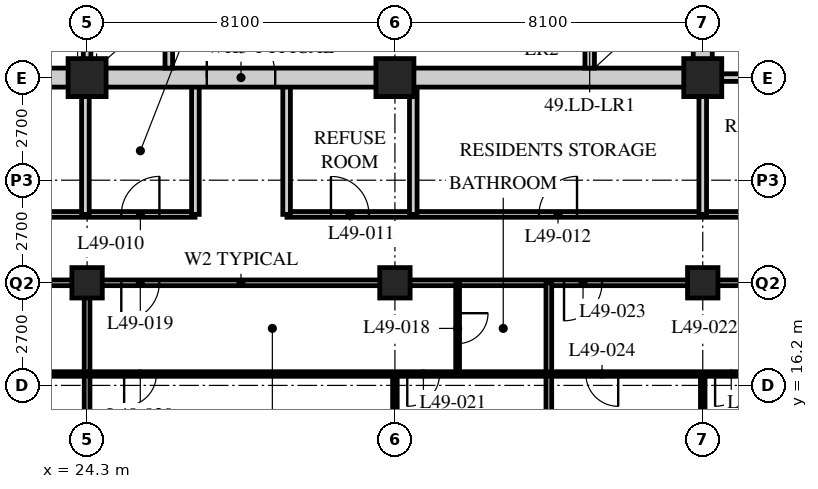
"""IFC4 building model, lengths in metres.
Left out: names, types, materials, properties, quantities, classifications, styles, units other than length and angle.
Written with IfcOpenShell. Run it as: python <this file> out.ifc"""

import sys

from ifc_helpers import new_model, si_unit, direction, frame, frame_2d, origin, origin_2d, place, context, subcontext, project, spatial, rectangle, hollow_rectangle, extrude, element, fill, save


model = new_model("IFC4")
c1 = context("Model", 3, precision=1e-05, world=origin(), true_north=direction((0.0, 1.0)))
c2 = subcontext(c1, "Body", "Model", "MODEL_VIEW")
j1 = project(units=[si_unit("LENGTHUNIT", "METRE"), si_unit("PLANEANGLEUNIT", "RADIAN")], contexts=[c1])
p1 = place(None, origin())
s1 = spatial("IfcSite", under=j1, at=p1, CompositionType="ELEMENT")
p2 = place(p1, origin())
s2 = spatial("IfcBuilding", under=s1, at=p2, CompositionType="ELEMENT")
p3 = place(p2, frame((0.0, 0.0, 192.0)))
s3 = spatial("IfcBuildingStorey", under=s2, at=p3, CompositionType="ELEMENT", Elevation=192.0)
p4 = place(p3, frame((24.3, 18.9, 0.0), z_axis=(0.0, 0.0, 1.0), x_axis=(1.0, 0.0, 0.0)))
e1 = element("IfcColumn", 1, at=p4, inside=s3, PredefinedType="COLUMN", context=c2, shape_type="SweptSolid", body=[
    extrude(hollow_rectangle(XDim=0.8, YDim=0.8, WallThickness=0.08, at=origin_2d()), origin(), (0.0, 0.0, 1.0), 3.6),
])
p5 = place(p3, frame((24.3, 24.3, 0.0), z_axis=(0.0, 0.0, 1.0), x_axis=(1.0, 0.0, 0.0)))
e2 = element("IfcColumn", 2, at=p5, inside=s3, PredefinedType="COLUMN", context=c2, shape_type="SweptSolid", body=[
    extrude(hollow_rectangle(XDim=1.0, YDim=1.0, WallThickness=0.1, at=origin_2d()), origin(), (0.0, 0.0, 1.0), 3.6),
])
p6 = place(p3, frame((32.4, 18.9, 0.0), z_axis=(0.0, 0.0, 1.0), x_axis=(1.0, 0.0, 0.0)))
e3 = element("IfcColumn", 3, at=p6, inside=s3, PredefinedType="COLUMN", context=c2, shape_type="SweptSolid", body=[
    extrude(hollow_rectangle(XDim=0.8, YDim=0.8, WallThickness=0.08, at=origin_2d()), origin(), (0.0, 0.0, 1.0), 3.6),
])
p7 = place(p3, frame((32.4, 24.3, 0.0), z_axis=(0.0, 0.0, 1.0), x_axis=(1.0, 0.0, 0.0)))
e4 = element("IfcColumn", 4, at=p7, inside=s3, PredefinedType="COLUMN", context=c2, shape_type="SweptSolid", body=[
    extrude(hollow_rectangle(XDim=1.0, YDim=1.0, WallThickness=0.1, at=origin_2d()), origin(), (0.0, 0.0, 1.0), 3.6),
])
p8 = place(p3, frame((40.5, 18.9, 0.0), z_axis=(0.0, 0.0, 1.0), x_axis=(1.0, 0.0, 0.0)))
e5 = element("IfcColumn", 5, at=p8, inside=s3, PredefinedType="COLUMN", context=c2, shape_type="SweptSolid", body=[
    extrude(hollow_rectangle(XDim=0.8, YDim=0.8, WallThickness=0.08, at=origin_2d()), origin(), (0.0, 0.0, 1.0), 3.6),
])
p9 = place(p3, frame((40.5, 24.3, 0.0), z_axis=(0.0, 0.0, 1.0), x_axis=(1.0, 0.0, 0.0)))
e6 = element("IfcColumn", 6, at=p9, inside=s3, PredefinedType="COLUMN", context=c2, shape_type="SweptSolid", body=[
    extrude(hollow_rectangle(XDim=1.0, YDim=1.0, WallThickness=0.1, at=origin_2d()), origin(), (0.0, 0.0, 1.0), 3.6),
])
p10 = place(p3, frame((8.1, 18.9, 0.0), z_axis=(0.0, 0.0, 1.0), x_axis=(1.0, 0.0, 0.0)))
e7 = element("IfcWall", 7, at=p10, inside=s3, PredefinedType="PARTITIONING", context=c2, shape_type="SweptSolid", body=[
    extrude(rectangle(XDim=40.5, YDim=0.15, at=frame_2d((20.25, 0.0))), origin(), (0.0, 0.0, 1.0), 2.778),
])
p11 = place(p10, frame((4.45, 0.0, 0.0)))
e8 = element("IfcOpeningElement", 8, at=p11, cuts=e7, PredefinedType="OPENING", context=c2, shape_type="SweptSolid", body=[
    extrude(rectangle(XDim=1.0, YDim=2.1, at=frame_2d((0.5, 1.05))), frame((0.0, 0.085, 0.0), z_axis=(0.0, -1.0, 0.0), x_axis=(1.0, 0.0, 0.0)), (0.0, 0.0, 1.0), 0.17),
])
p12 = place(p10, frame((17.1, 0.0, 0.0)))
e9 = element("IfcOpeningElement", 9, at=p12, cuts=e7, PredefinedType="OPENING", context=c2, shape_type="SweptSolid", body=[
    extrude(rectangle(XDim=1.0, YDim=2.1, at=frame_2d((0.5, 1.05))), frame((0.0, 0.085, 0.0), z_axis=(0.0, -1.0, 0.0), x_axis=(1.0, 0.0, 0.0)), (0.0, 0.0, 1.0), 0.17),
])
p13 = place(p10, frame((28.75, 0.0, 0.0)))
e10 = element("IfcOpeningElement", 10, at=p13, cuts=e7, PredefinedType="OPENING", context=c2, shape_type="SweptSolid", body=[
    extrude(rectangle(XDim=1.0, YDim=2.1, at=frame_2d((0.5, 1.05))), frame((0.0, 0.085, 0.0), z_axis=(0.0, -1.0, 0.0), x_axis=(1.0, 0.0, 0.0)), (0.0, 0.0, 1.0), 0.17),
])
p14 = place(p10, frame((2.625, 0.0, 0.0)))
e11 = element("IfcOpeningElement", 11, at=p14, cuts=e7, PredefinedType="OPENING", context=c2, shape_type="SweptSolid", body=[
    extrude(rectangle(XDim=1.0, YDim=2.1, at=frame_2d((0.5, 1.05))), frame((0.0, 0.085, 0.0), z_axis=(0.0, -1.0, 0.0), x_axis=(1.0, 0.0, 0.0)), (0.0, 0.0, 1.0), 0.17),
])
p15 = place(p10, frame((36.875, 0.0, 0.0)))
e12 = element("IfcOpeningElement", 12, at=p15, cuts=e7, PredefinedType="OPENING", context=c2, shape_type="SweptSolid", body=[
    extrude(rectangle(XDim=1.0, YDim=2.1, at=frame_2d((0.5, 1.05))), frame((0.0, 0.085, 0.0), z_axis=(0.0, -1.0, 0.0), x_axis=(1.0, 0.0, 0.0)), (0.0, 0.0, 1.0), 0.17),
])
p16 = place(p3, frame((9.9, 20.7, 0.0), z_axis=(0.0, 0.0, 1.0), x_axis=(1.0, 0.0, 0.0)))
e13 = element("IfcWall", 13, at=p16, inside=s3, PredefinedType="PARTITIONING", context=c2, shape_type="SweptSolid", body=[
    extrude(rectangle(XDim=17.24, YDim=0.15, at=frame_2d((8.62, 0.0))), origin(), (0.0, 0.0, 1.0), 3.39),
])
p17 = place(p16, frame((0.472, 0.0, 0.0)))
e14 = element("IfcOpeningElement", 14, at=p17, cuts=e13, PredefinedType="OPENING", context=c2, shape_type="SweptSolid", body=[
    extrude(rectangle(XDim=1.0, YDim=2.1, at=frame_2d((0.5, 1.05))), frame((0.0, 0.085, 0.0), z_axis=(0.0, -1.0, 0.0), x_axis=(1.0, 0.0, 0.0)), (0.0, 0.0, 1.0), 0.17),
])
p18 = place(p16, frame((3.622, 0.0, 0.0)))
e15 = element("IfcOpeningElement", 15, at=p18, cuts=e13, PredefinedType="OPENING", context=c2, shape_type="SweptSolid", body=[
    extrude(rectangle(XDim=1.0, YDim=2.1, at=frame_2d((0.5, 1.05))), frame((0.0, 0.085, 0.0), z_axis=(0.0, -1.0, 0.0), x_axis=(1.0, 0.0, 0.0)), (0.0, 0.0, 1.0), 0.17),
])
p19 = place(p16, frame((9.828, 0.0, 0.0)))
e16 = element("IfcOpeningElement", 16, at=p19, cuts=e13, PredefinedType="OPENING", context=c2, shape_type="SweptSolid", body=[
    extrude(rectangle(XDim=1.0, YDim=2.1, at=frame_2d((0.5, 1.05))), frame((0.0, 0.085, 0.0), z_axis=(0.0, -1.0, 0.0), x_axis=(1.0, 0.0, 0.0)), (0.0, 0.0, 1.0), 0.17),
])
p20 = place(p16, frame((15.303, 0.0, 0.0)))
e17 = element("IfcOpeningElement", 17, at=p20, cuts=e13, PredefinedType="OPENING", context=c2, shape_type="SweptSolid", body=[
    extrude(rectangle(XDim=1.0, YDim=2.1, at=frame_2d((0.5, 1.05))), frame((0.0, 0.085, 0.0), z_axis=(0.0, -1.0, 0.0), x_axis=(1.0, 0.0, 0.0)), (0.0, 0.0, 1.0), 0.17),
])
p21 = place(p3, frame((29.56, 20.7, 0.0), z_axis=(0.0, 0.0, 1.0), x_axis=(1.0, 0.0, 0.0)))
e18 = element("IfcWall", 18, at=p21, inside=s3, PredefinedType="PARTITIONING", context=c2, shape_type="SweptSolid", body=[
    extrude(rectangle(XDim=17.24, YDim=0.15, at=frame_2d((8.62, 0.0))), origin(), (0.0, 0.0, 1.0), 3.39),
])
p22 = place(p21, frame((1.157, 0.0, 0.0)))
e19 = element("IfcOpeningElement", 19, at=p22, cuts=e18, PredefinedType="OPENING", context=c2, shape_type="SweptSolid", body=[
    extrude(rectangle(XDim=1.0, YDim=2.1, at=frame_2d((0.5, 1.05))), frame((0.0, 0.085, 0.0), z_axis=(0.0, -1.0, 0.0), x_axis=(1.0, 0.0, 0.0)), (0.0, 0.0, 1.0), 0.17),
])
p23 = place(p21, frame((6.632, 0.0, 0.0)))
e20 = element("IfcOpeningElement", 20, at=p23, cuts=e18, PredefinedType="OPENING", context=c2, shape_type="SweptSolid", body=[
    extrude(rectangle(XDim=1.0, YDim=2.1, at=frame_2d((0.5, 1.05))), frame((0.0, 0.085, 0.0), z_axis=(0.0, -1.0, 0.0), x_axis=(1.0, 0.0, 0.0)), (0.0, 0.0, 1.0), 0.17),
])
p24 = place(p21, frame((13.59, 0.0, 0.0)))
e21 = element("IfcOpeningElement", 21, at=p24, cuts=e18, PredefinedType="OPENING", context=c2, shape_type="SweptSolid", body=[
    extrude(rectangle(XDim=1.0, YDim=2.1, at=frame_2d((0.5, 1.05))), frame((0.0, 0.085, 0.0), z_axis=(0.0, -1.0, 0.0), x_axis=(1.0, 0.0, 0.0)), (0.0, 0.0, 1.0), 0.17),
])
for number, where, z_axis, x_axis in (
    (22, (24.256, 20.7, 0.0), (0.0, 0.0, 1.0), (0.0, 1.0, 0.0)),
    (23, (40.5, 20.7, 0.0), (0.0, 0.0, 1.0), (0.0, 1.0, 0.0)),
):
    element("IfcWall", number, at=place(p3, frame(where, z_axis=z_axis, x_axis=x_axis)), inside=s3, PredefinedType="SOLIDWALL", context=c2, shape_type="SweptSolid", body=[
        extrude(rectangle(XDim=3.6, YDim=0.2, at=frame_2d((1.8, 0.0))), origin(), (0.0, 0.0, 1.0), 2.778),
    ])
for number, where, z_axis, x_axis in (
    (24, (32.883, 20.7, 0.0), (0.0, 0.0, 1.0), (0.0, 1.0, 0.0)),
    (25, (27.15, 20.7, 0.0), (0.0, 0.0, 1.0), (0.0, 1.0, 0.0)),
    (26, (29.55, 20.7, 0.0), (0.0, 0.0, 1.0), (0.0, 1.0, 0.0)),
):
    element("IfcWall", number, at=place(p3, frame(where, z_axis=z_axis, x_axis=x_axis)), inside=s3, PredefinedType="SOLIDWALL", context=c2, shape_type="SweptSolid", body=[
        extrude(rectangle(XDim=3.6, YDim=0.2, at=frame_2d((1.8, 0.0))), origin(), (0.0, 0.0, 1.0), 3.39),
    ])
p25 = place(p3, frame((40.5, 24.3, 0.0), z_axis=(0.0, 0.0, 1.0), x_axis=(1.0, 0.0, 0.0)))
e27 = element("IfcWall", 27, at=p25, inside=s3, PredefinedType="SOLIDWALL", context=c2, shape_type="SweptSolid", body=[
    extrude(rectangle(XDim=6.3, YDim=0.2, at=frame_2d((3.15, 0.0))), origin(), (0.0, 0.0, 1.0), 3.39),
])
p26 = place(p3, frame((24.3, 18.9, 0.0), z_axis=(0.0, 0.0, 1.0), x_axis=(0.0, -1.0, 0.0)))
e28 = element("IfcWall", 28, at=p26, inside=s3, PredefinedType="PARTITIONING", context=c2, shape_type="SweptSolid", body=[
    extrude(rectangle(XDim=7.8, YDim=0.15, at=frame_2d((3.9, 0.0))), origin(), (0.0, 0.0, 1.0), 2.778),
])
p27 = place(p3, frame((34.05, 18.9, 0.0), z_axis=(0.0, 0.0, 1.0), x_axis=(0.0, -1.0, 0.0)))
e29 = element("IfcWall", 29, at=p27, inside=s3, PredefinedType="PARTITIONING", context=c2, shape_type="SweptSolid", body=[
    extrude(rectangle(XDim=2.4, YDim=0.1, at=frame_2d((1.2, 0.0))), origin(), (0.0, 0.0, 1.0), 3.39),
])
p28 = place(p27, frame((0.8, 0.0, 0.0)))
e30 = element("IfcOpeningElement", 30, at=p28, cuts=e29, PredefinedType="OPENING", context=c2, shape_type="SweptSolid", body=[
    extrude(rectangle(XDim=0.8, YDim=2.1, at=frame_2d((0.4, 1.05))), frame((0.0, 0.06, 0.0), z_axis=(0.0, -1.0, 0.0), x_axis=(1.0, 0.0, 0.0)), (0.0, 0.0, 1.0), 0.12),
])
p29 = place(p3, frame((32.4, 16.5, 0.0), z_axis=(0.0, 0.0, 1.0), x_axis=(0.0, -1.0, 0.0)))
e31 = element("IfcWall", 31, at=p29, inside=s3, PredefinedType="PARTITIONING", context=c2, shape_type="SweptSolid", body=[
    extrude(rectangle(XDim=5.4, YDim=0.12, at=frame_2d((2.7, 0.0))), origin(), (0.0, 0.0, 1.0), 2.778),
])
p30 = place(p3, frame((36.45, 18.9, 0.0), z_axis=(0.0, 0.0, 1.0), x_axis=(0.0, -1.0, 0.0)))
e32 = element("IfcWall", 32, at=p30, inside=s3, PredefinedType="PARTITIONING", context=c2, shape_type="SweptSolid", body=[
    extrude(rectangle(XDim=7.8, YDim=0.15, at=frame_2d((3.9, 0.0))), origin(), (0.0, 0.0, 1.0), 3.39),
])
p31 = place(p3, frame((40.5, 16.5, 0.0), z_axis=(0.0, 0.0, 1.0), x_axis=(0.0, -1.0, 0.0)))
e33 = element("IfcWall", 33, at=p31, inside=s3, PredefinedType="PARTITIONING", context=c2, shape_type="SweptSolid", body=[
    extrude(rectangle(XDim=5.4, YDim=0.12, at=frame_2d((2.7, 0.0))), origin(), (0.0, 0.0, 1.0), 2.778),
])
p32 = place(p3, frame((8.1, 16.5, 0.0), z_axis=(0.0, 0.0, 1.0), x_axis=(1.0, 0.0, 0.0)))
e34 = element("IfcWall", 34, at=p32, inside=s3, PredefinedType="PARTITIONING", context=c2, shape_type="SweptSolid", body=[
    extrude(rectangle(XDim=40.5, YDim=0.12, at=frame_2d((20.25, 0.0))), origin(), (0.0, 0.0, 1.0), 3.39),
])
p33 = place(p32, frame((5.025, 0.0, 0.0)))
e35 = element("IfcOpeningElement", 35, at=p33, cuts=e34, PredefinedType="OPENING", context=c2, shape_type="SweptSolid", body=[
    extrude(rectangle(XDim=0.85, YDim=2.1, at=frame_2d((0.425, 1.05))), frame((0.0, 0.07, 0.0), z_axis=(0.0, -1.0, 0.0), x_axis=(1.0, 0.0, 0.0)), (0.0, 0.0, 1.0), 0.14),
])
p34 = place(p32, frame((12.475, 0.0, 0.0)))
e36 = element("IfcOpeningElement", 36, at=p34, cuts=e34, PredefinedType="OPENING", context=c2, shape_type="SweptSolid", body=[
    extrude(rectangle(XDim=0.85, YDim=2.1, at=frame_2d((0.425, 1.05))), frame((0.0, 0.07, 0.0), z_axis=(0.0, -1.0, 0.0), x_axis=(1.0, 0.0, 0.0)), (0.0, 0.0, 1.0), 0.14),
])
p35 = place(p32, frame((17.175, 0.0, 0.0)))
e37 = element("IfcOpeningElement", 37, at=p35, cuts=e34, PredefinedType="OPENING", context=c2, shape_type="SweptSolid", body=[
    extrude(rectangle(XDim=0.85, YDim=2.1, at=frame_2d((0.425, 1.05))), frame((0.0, 0.07, 0.0), z_axis=(0.0, -1.0, 0.0), x_axis=(1.0, 0.0, 0.0)), (0.0, 0.0, 1.0), 0.14),
])
p36 = place(p32, frame((24.625, 0.0, 0.0)))
e38 = element("IfcOpeningElement", 38, at=p36, cuts=e34, PredefinedType="OPENING", context=c2, shape_type="SweptSolid", body=[
    extrude(rectangle(XDim=0.85, YDim=2.1, at=frame_2d((0.425, 1.05))), frame((0.0, 0.07, 0.0), z_axis=(0.0, -1.0, 0.0), x_axis=(1.0, 0.0, 0.0)), (0.0, 0.0, 1.0), 0.14),
])
p37 = place(p32, frame((29.325, 0.0, 0.0)))
e39 = element("IfcOpeningElement", 39, at=p37, cuts=e34, PredefinedType="OPENING", context=c2, shape_type="SweptSolid", body=[
    extrude(rectangle(XDim=0.85, YDim=2.1, at=frame_2d((0.425, 1.05))), frame((0.0, 0.07, 0.0), z_axis=(0.0, -1.0, 0.0), x_axis=(1.0, 0.0, 0.0)), (0.0, 0.0, 1.0), 0.14),
])
p38 = place(p32, frame((32.725, 0.0, 0.0)))
e40 = element("IfcOpeningElement", 40, at=p38, cuts=e34, PredefinedType="OPENING", context=c2, shape_type="SweptSolid", body=[
    extrude(rectangle(XDim=0.85, YDim=2.1, at=frame_2d((0.425, 1.05))), frame((0.0, 0.07, 0.0), z_axis=(0.0, -1.0, 0.0), x_axis=(1.0, 0.0, 0.0)), (0.0, 0.0, 1.0), 0.14),
])
p39 = place(p32, frame((2.725, 0.0, 0.0)))
e41 = element("IfcOpeningElement", 41, at=p39, cuts=e34, PredefinedType="OPENING", context=c2, shape_type="SweptSolid", body=[
    extrude(rectangle(XDim=0.85, YDim=2.1, at=frame_2d((0.425, 1.05))), frame((0.0, 0.07, 0.0), z_axis=(0.0, -1.0, 0.0), x_axis=(1.0, 0.0, 0.0)), (0.0, 0.0, 1.0), 0.14),
])
p40 = place(p32, frame((36.925, 0.0, 0.0)))
e42 = element("IfcOpeningElement", 42, at=p40, cuts=e34, PredefinedType="OPENING", context=c2, shape_type="SweptSolid", body=[
    extrude(rectangle(XDim=0.85, YDim=2.1, at=frame_2d((0.425, 1.05))), frame((0.0, 0.07, 0.0), z_axis=(0.0, -1.0, 0.0), x_axis=(1.0, 0.0, 0.0)), (0.0, 0.0, 1.0), 0.14),
])
p41 = place(p3, frame((15.95, 24.3, 0.0), z_axis=(0.0, 0.0, 1.0), x_axis=(1.0, 0.0, 0.0)))
e43 = element("IfcWall", 43, at=p41, inside=s3, PredefinedType="SOLIDWALL", context=c2, shape_type="SweptSolid", body=[
    extrude(rectangle(XDim=24.8, YDim=0.5, at=frame_2d((12.4, 0.0))), origin(), (0.0, 0.0, 1.0), 2.74),
])
p42 = place(p41, frame((11.5, 0.0, 0.0)))
e44 = element("IfcOpeningElement", 44, at=p42, cuts=e43, PredefinedType="OPENING", context=c2, shape_type="SweptSolid", body=[
    extrude(rectangle(XDim=1.8, YDim=2.4, at=frame_2d((0.9, 1.2))), frame((0.0, 0.26, 0.0), z_axis=(0.0, -1.0, 0.0), x_axis=(1.0, 0.0, 0.0)), (0.0, 0.0, 1.0), 0.52),
])
p43 = place(p3, frame((40.5, 24.55, 0.0), z_axis=(0.0, 0.0, 1.0), x_axis=(0.0, 1.0, 0.0)))
e45 = element("IfcWall", 45, at=p43, inside=s3, PredefinedType="SOLIDWALL", context=c2, shape_type="SweptSolid", body=[
    extrude(rectangle(XDim=15.7, YDim=0.5, at=frame_2d((7.85, 0.0))), origin(), (0.0, 0.0, 1.0), 2.778),
])
p44 = place(p3, frame((24.3, 24.55, 0.0), z_axis=(0.0, 0.0, 1.0), x_axis=(0.0, 1.0, 0.0)))
e46 = element("IfcWall", 46, at=p44, inside=s3, PredefinedType="SOLIDWALL", context=c2, shape_type="SweptSolid", body=[
    extrude(rectangle(XDim=7.75, YDim=0.2, at=frame_2d((3.875, 0.0))), origin(), (0.0, 0.0, 1.0), 2.778),
])
p45 = place(p44, frame((4.6, 0.0, 0.0)))
e47 = element("IfcOpeningElement", 47, at=p45, cuts=e46, PredefinedType="OPENING", context=c2, shape_type="SweptSolid", body=[
    extrude(rectangle(XDim=1.2, YDim=2.1, at=frame_2d((0.6, 1.05))), frame((0.0, 0.11, 0.0), z_axis=(0.0, -1.0, 0.0), x_axis=(1.0, 0.0, 0.0)), (0.0, 0.0, 1.0), 0.22),
])
p46 = place(p3, frame((26.45, 24.55, 0.0), z_axis=(0.0, 0.0, 1.0), x_axis=(0.0, 1.0, 0.0)))
e48 = element("IfcWall", 48, at=p46, inside=s3, PredefinedType="SOLIDWALL", context=c2, shape_type="SweptSolid", body=[
    extrude(rectangle(XDim=1.6, YDim=0.2, at=frame_2d((0.8, 0.0))), origin(), (0.0, 0.0, 1.0), 3.39),
])
p47 = place(p3, frame((37.525, 24.55, 0.0), z_axis=(0.0, 0.0, 1.0), x_axis=(0.0, 1.0, 0.0)))
e49 = element("IfcWall", 49, at=p47, inside=s3, PredefinedType="SOLIDWALL", context=c2, shape_type="SweptSolid", body=[
    extrude(rectangle(XDim=7.75, YDim=0.25, at=frame_2d((3.875, 0.0))), origin(), (0.0, 0.0, 1.0), 3.39),
])
p48 = place(p47, frame((0.65, 0.0, 0.0)))
e50 = element("IfcOpeningElement", 50, at=p48, cuts=e49, PredefinedType="OPENING", context=c2, shape_type="SweptSolid", body=[
    extrude(rectangle(XDim=1.1, YDim=2.4, at=frame_2d((0.55, 1.2))), frame((0.0, 0.135, 0.0), z_axis=(0.0, -1.0, 0.0), x_axis=(1.0, 0.0, 0.0)), (0.0, 0.0, 1.0), 0.27),
])
p49 = place(p47, frame((3.25, 0.0, 0.0)))
e51 = element("IfcOpeningElement", 51, at=p49, cuts=e49, PredefinedType="OPENING", context=c2, shape_type="SweptSolid", body=[
    extrude(rectangle(XDim=1.1, YDim=2.4, at=frame_2d((0.55, 1.2))), frame((0.0, 0.135, 0.0), z_axis=(0.0, -1.0, 0.0), x_axis=(1.0, 0.0, 0.0)), (0.0, 0.0, 1.0), 0.27),
])
p50 = place(p47, frame((5.85, 0.0, 0.0)))
e52 = element("IfcOpeningElement", 52, at=p50, cuts=e49, PredefinedType="OPENING", context=c2, shape_type="SweptSolid", body=[
    extrude(rectangle(XDim=1.1, YDim=2.4, at=frame_2d((0.55, 1.2))), frame((0.0, 0.135, 0.0), z_axis=(0.0, -1.0, 0.0), x_axis=(1.0, 0.0, 0.0)), (0.0, 0.0, 1.0), 0.27),
])
p51 = place(p20, origin())
e53 = element("IfcDoor", 53, at=p51, inside=s3, OperationType="SINGLE_SWING_RIGHT", PredefinedType="DOOR", context=c2, shape_type="SweptSolid", body=[
    extrude(rectangle(XDim=1.0, YDim=2.1, at=frame_2d((0.5, 1.05))), frame((0.0, 0.025, 0.0), z_axis=(0.0, -1.0, 0.0), x_axis=(1.0, 0.0, 0.0)), (0.0, 0.0, 1.0), 0.05),
])
fill(e17, e53)
p52 = place(p22, origin())
e54 = element("IfcDoor", 54, at=p52, inside=s3, OperationType="SINGLE_SWING_LEFT", PredefinedType="DOOR", context=c2, shape_type="SweptSolid", body=[
    extrude(rectangle(XDim=1.0, YDim=2.1, at=frame_2d((0.5, 1.05))), frame((0.0, 0.025, 0.0), z_axis=(0.0, -1.0, 0.0), x_axis=(1.0, 0.0, 0.0)), (0.0, 0.0, 1.0), 0.05),
])
fill(e19, e54)
p53 = place(p23, origin())
e55 = element("IfcDoor", 55, at=p53, inside=s3, OperationType="SINGLE_SWING_RIGHT", PredefinedType="DOOR", context=c2, shape_type="SweptSolid", body=[
    extrude(rectangle(XDim=1.0, YDim=2.1, at=frame_2d((0.5, 1.05))), frame((0.0, 0.025, 0.0), z_axis=(0.0, -1.0, 0.0), x_axis=(1.0, 0.0, 0.0)), (0.0, 0.0, 1.0), 0.05),
])
fill(e20, e55)
p54 = place(p28, origin())
e56 = element("IfcDoor", 56, at=p54, inside=s3, OperationType="SINGLE_SWING_LEFT", PredefinedType="DOOR", context=c2, shape_type="SweptSolid", body=[
    extrude(rectangle(XDim=0.8, YDim=2.1, at=frame_2d((0.4, 1.05))), frame((0.0, 0.025, 0.0), z_axis=(0.0, -1.0, 0.0), x_axis=(1.0, 0.0, 0.0)), (0.0, 0.0, 1.0), 0.05),
])
fill(e30, e56)
p55 = place(p12, origin())
e57 = element("IfcDoor", 57, at=p55, inside=s3, OperationType="SINGLE_SWING_RIGHT", PredefinedType="DOOR", context=c2, shape_type="SweptSolid", body=[
    extrude(rectangle(XDim=1.0, YDim=2.1, at=frame_2d((0.5, 1.05))), frame((0.0, 0.025, 0.0), z_axis=(0.0, -1.0, 0.0), x_axis=(1.0, 0.0, 0.0)), (0.0, 0.0, 1.0), 0.05),
])
fill(e9, e57)
p56 = place(p35, origin())
e58 = element("IfcDoor", 58, at=p56, inside=s3, OperationType="SINGLE_SWING_RIGHT", PredefinedType="DOOR", context=c2, shape_type="SweptSolid", body=[
    extrude(rectangle(XDim=0.85, YDim=2.1, at=frame_2d((0.425, 1.05))), frame((0.0, 0.025, 0.0), z_axis=(0.0, -1.0, 0.0), x_axis=(1.0, 0.0, 0.0)), (0.0, 0.0, 1.0), 0.05),
])
fill(e37, e58)
p57 = place(p36, origin())
e59 = element("IfcDoor", 59, at=p57, inside=s3, OperationType="SINGLE_SWING_RIGHT", PredefinedType="DOOR", context=c2, shape_type="SweptSolid", body=[
    extrude(rectangle(XDim=0.85, YDim=2.1, at=frame_2d((0.425, 1.05))), frame((0.0, 0.025, 0.0), z_axis=(0.0, -1.0, 0.0), x_axis=(1.0, 0.0, 0.0)), (0.0, 0.0, 1.0), 0.05),
])
fill(e38, e59)
p58 = place(p13, origin())
e60 = element("IfcDoor", 60, at=p58, inside=s3, OperationType="SINGLE_SWING_RIGHT", PredefinedType="DOOR", context=c2, shape_type="SweptSolid", body=[
    extrude(rectangle(XDim=1.0, YDim=2.1, at=frame_2d((0.5, 1.05))), frame((0.0, 0.025, 0.0), z_axis=(0.0, -1.0, 0.0), x_axis=(1.0, 0.0, 0.0)), (0.0, 0.0, 1.0), 0.05),
])
fill(e10, e60)
p59 = place(p37, origin())
e61 = element("IfcDoor", 61, at=p59, inside=s3, OperationType="SINGLE_SWING_LEFT", PredefinedType="DOOR", context=c2, shape_type="SweptSolid", body=[
    extrude(rectangle(XDim=0.85, YDim=2.1, at=frame_2d((0.425, 1.05))), frame((0.0, 0.025, 0.0), z_axis=(0.0, -1.0, 0.0), x_axis=(1.0, 0.0, 0.0)), (0.0, 0.0, 1.0), 0.05),
])
fill(e39, e61)
p60 = place(p38, origin())
e62 = element("IfcDoor", 62, at=p60, inside=s3, OperationType="SINGLE_SWING_RIGHT", PredefinedType="DOOR", context=c2, shape_type="SweptSolid", body=[
    extrude(rectangle(XDim=0.85, YDim=2.1, at=frame_2d((0.425, 1.05))), frame((0.0, 0.025, 0.0), z_axis=(0.0, -1.0, 0.0), x_axis=(1.0, 0.0, 0.0)), (0.0, 0.0, 1.0), 0.05),
])
fill(e40, e62)
p61 = place(p42, origin())
e63 = element("IfcDoor", 63, at=p61, inside=s3, OperationType="DOUBLE_DOOR_SINGLE_SWING", PredefinedType="DOOR", context=c2, shape_type="SweptSolid", body=[
    extrude(rectangle(XDim=1.8, YDim=2.4, at=frame_2d((0.9, 1.2))), frame((0.0, 0.025, 0.0), z_axis=(0.0, -1.0, 0.0), x_axis=(1.0, 0.0, 0.0)), (0.0, 0.0, 1.0), 0.05),
])
fill(e44, e63)
save(model, sys.argv[1])
